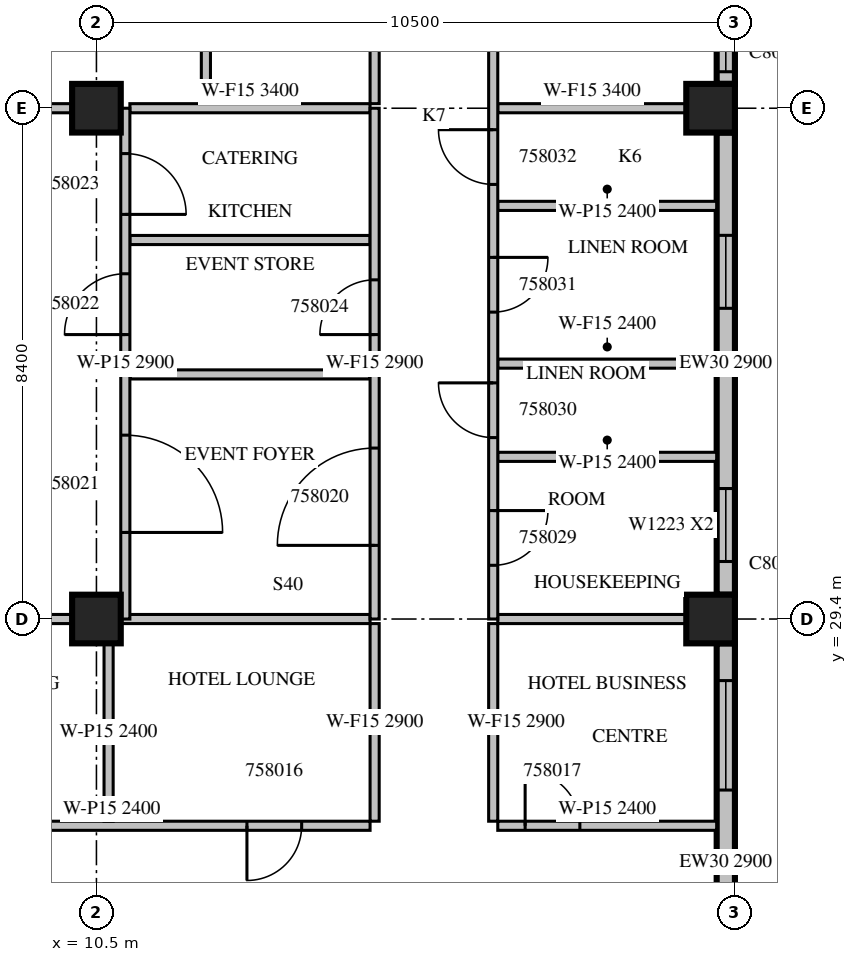
"""IFC4 building model, lengths in metres.
Left out: names, types, materials, properties, quantities, classifications, styles, units other than length and angle.
Written with IfcOpenShell. Run it as: python <this file> out.ifc"""

import sys

from ifc_helpers import new_model, si_unit, direction, frame, frame_2d, origin, origin_2d, place, context, subcontext, project, spatial, rectangle, extrude, source, transform, mapped, element, fill, save


model = new_model("IFC4")
c1 = context("Model", 3, precision=1e-05, world=origin(), true_north=direction((0.0, 1.0)))
c2 = subcontext(c1, "Body", "Model", "MODEL_VIEW")
j1 = project(units=[si_unit("LENGTHUNIT", "METRE"), si_unit("PLANEANGLEUNIT", "RADIAN")], contexts=[c1])
p1 = place(None, origin())
s1 = spatial("IfcSite", under=j1, at=p1, CompositionType="ELEMENT")
p2 = place(p1, origin())
s2 = spatial("IfcBuilding", under=s1, at=p2, CompositionType="ELEMENT")
p3 = place(p2, frame((0.0, 0.0, 253.8)))
s3 = spatial("IfcBuildingStorey", under=s2, at=p3, CompositionType="ELEMENT", Elevation=253.8)
m1 = source(origin(), c2, "Body", "SweptSolid", [
    extrude(rectangle(XDim=0.8, YDim=0.8, at=origin_2d()), origin(), (0.0, 0.0, 1.0), 3.8),
])
for number, where, z_axis, x_axis in (
    (1, (10.5, 29.4, 0.0), (0.0, 0.0, 1.0), (1.0, 0.0, 0.0)),
    (2, (20.6, 29.4, 0.0), (0.0, 0.0, 1.0), (1.0, 0.0, 0.0)),
    (3, (10.5, 37.8, 0.0), (0.0, 0.0, 1.0), (1.0, 0.0, 0.0)),
    (4, (20.6, 37.8, 0.0), (0.0, 0.0, 1.0), (1.0, 0.0, 0.0)),
):
    element("IfcColumn", number, at=place(p3, frame(where, z_axis=z_axis, x_axis=x_axis)), inside=s3, PredefinedType="COLUMN", context=c2, shape_type="MappedRepresentation", body=[
        mapped(m1, transform((0.0, 0.0, 0.0), scale=1.0)),
    ])
m2 = source(origin(), c2, "Body", "SweptSolid", [
    extrude(rectangle(XDim=7.2, YDim=0.3, at=frame_2d((3.6, 0.0))), origin(), (0.0, 0.0, 1.0), 2.9),
])
p4 = place(p3, frame((20.85, 21.8, 0.0), z_axis=(0.0, 0.0, 1.0), x_axis=(0.0, 1.0, 0.0)))
e5 = element("IfcWall", 5, at=p4, inside=s3, PredefinedType="STANDARD", context=c2, shape_type="MappedRepresentation", body=[
    mapped(m2, transform((0.0, 0.0, 0.0), scale=1.0)),
])
m3 = source(origin(), c2, "Body", "SweptSolid", [
    extrude(rectangle(XDim=1.8, YDim=2.3, at=frame_2d((0.9, 1.15))), frame((0.0, 0.16, 0.0), z_axis=(0.0, -1.0, 0.0), x_axis=(1.0, 0.0, 0.0)), (0.0, 0.0, 1.0), 0.32),
])
p5 = place(p4, frame((0.4, 0.0, 0.6)))
e6 = element("IfcOpeningElement", 6, at=p5, cuts=e5, PredefinedType="OPENING", context=c2, shape_type="MappedRepresentation", body=[
    mapped(m3, transform((0.0, 0.0, 0.0), scale=1.0)),
])
p6 = place(p4, frame((4.787, 0.0, 0.6)))
e7 = element("IfcOpeningElement", 7, at=p6, cuts=e5, PredefinedType="OPENING", context=c2, shape_type="MappedRepresentation", body=[
    mapped(m3, transform((0.0, 0.0, 0.0), scale=1.0)),
])
m4 = source(origin(), c2, "Body", "SweptSolid", [
    extrude(rectangle(XDim=7.6, YDim=0.3, at=frame_2d((3.8, 0.0))), origin(), (0.0, 0.0, 1.0), 2.9),
])
p7 = place(p3, frame((20.85, 29.8, 0.0), z_axis=(0.0, 0.0, 1.0), x_axis=(0.0, 1.0, 0.0)))
e8 = element("IfcWall", 8, at=p7, inside=s3, PredefinedType="STANDARD", context=c2, shape_type="MappedRepresentation", body=[
    mapped(m4, transform((0.0, 0.0, 0.0), scale=1.0)),
])
m5 = source(origin(), c2, "Body", "SweptSolid", [
    extrude(rectangle(XDim=1.2, YDim=2.3, at=frame_2d((0.6, 1.15))), frame((0.0, 0.16, 0.0), z_axis=(0.0, -1.0, 0.0), x_axis=(1.0, 0.0, 0.0)), (0.0, 0.0, 1.0), 0.32),
])
p8 = place(p7, frame((0.546, 0.0, 0.6)))
e9 = element("IfcOpeningElement", 9, at=p8, cuts=e8, PredefinedType="OPENING", context=c2, shape_type="MappedRepresentation", body=[
    mapped(m5, transform((0.0, 0.0, 0.0), scale=1.0)),
])
p9 = place(p7, frame((4.71, 0.0, 0.6)))
e10 = element("IfcOpeningElement", 10, at=p9, cuts=e8, PredefinedType="OPENING", context=c2, shape_type="MappedRepresentation", body=[
    mapped(m5, transform((0.0, 0.0, 0.0), scale=1.0)),
])
m6 = source(origin(), c2, "Body", "SweptSolid", [
    extrude(rectangle(XDim=3.8, YDim=0.3, at=frame_2d((1.9, 0.0))), origin(), (0.0, 0.0, 1.0), 3.4),
])
p10 = place(p3, frame((20.85, 38.2, 0.0), z_axis=(0.0, 0.0, 1.0), x_axis=(0.0, 1.0, 0.0)))
e11 = element("IfcWall", 11, at=p10, inside=s3, PredefinedType="STANDARD", context=c2, shape_type="MappedRepresentation", body=[
    mapped(m6, transform((0.0, 0.0, 0.0), scale=1.0)),
])
m7 = source(origin(), c2, "Body", "SweptSolid", [
    extrude(rectangle(XDim=3.0, YDim=2.3, at=frame_2d((1.5, 1.15))), frame((0.0, 0.16, 0.0), z_axis=(0.0, -1.0, 0.0), x_axis=(1.0, 0.0, 0.0)), (0.0, 0.0, 1.0), 0.32),
])
p11 = place(p10, frame((0.2, 0.0, 0.6)))
e12 = element("IfcOpeningElement", 12, at=p11, cuts=e11, PredefinedType="OPENING", context=c2, shape_type="MappedRepresentation", body=[
    mapped(m7, transform((0.0, 0.0, 0.0), scale=1.0)),
])
m8 = source(origin(), c2, "Body", "SweptSolid", [
    extrude(rectangle(XDim=8.495, YDim=0.15, at=frame_2d((4.247, 0.0))), origin(), (0.0, 0.0, 1.0), 2.4),
])
p12 = place(p3, frame((6.505, 26.0, 0.0), z_axis=(0.0, 0.0, 1.0), x_axis=(1.0, 0.0, 0.0)))
e13 = element("IfcWall", 13, at=p12, inside=s3, PredefinedType="PARTITIONING", context=c2, shape_type="MappedRepresentation", body=[
    mapped(m8, transform((0.0, 0.0, 0.0), scale=1.0)),
])
m9 = source(origin(), c2, "Body", "SweptSolid", [
    extrude(rectangle(XDim=0.9, YDim=2.1, at=frame_2d((0.45, 1.05))), frame((0.0, 0.085, 0.0), z_axis=(0.0, -1.0, 0.0), x_axis=(1.0, 0.0, 0.0)), (0.0, 0.0, 1.0), 0.17),
])
p13 = place(p12, frame((1.395, 0.0, 0.0)))
e14 = element("IfcOpeningElement", 14, at=p13, cuts=e13, PredefinedType="OPENING", context=c2, shape_type="MappedRepresentation", body=[
    mapped(m9, transform((0.0, 0.0, 0.0), scale=1.0)),
])
p14 = place(p12, frame((6.47, 0.0, 0.0)))
e15 = element("IfcOpeningElement", 15, at=p14, cuts=e13, PredefinedType="OPENING", context=c2, shape_type="MappedRepresentation", body=[
    mapped(m9, transform((0.0, 0.0, 0.0), scale=1.0)),
])
m10 = source(origin(), c2, "Body", "SweptSolid", [
    extrude(rectangle(XDim=3.6, YDim=0.15, at=frame_2d((1.8, 0.0))), origin(), (0.0, 0.0, 1.0), 2.4),
])
p15 = place(p3, frame((17.1, 26.0, 0.0), z_axis=(0.0, 0.0, 1.0), x_axis=(1.0, 0.0, 0.0)))
e16 = element("IfcWall", 16, at=p15, inside=s3, PredefinedType="PARTITIONING", context=c2, shape_type="MappedRepresentation", body=[
    mapped(m10, transform((0.0, 0.0, 0.0), scale=1.0)),
])
p16 = place(p15, frame((0.45, 0.0, 0.0)))
e17 = element("IfcOpeningElement", 17, at=p16, cuts=e16, PredefinedType="OPENING", context=c2, shape_type="MappedRepresentation", body=[
    mapped(m9, transform((0.0, 0.0, 0.0), scale=1.0)),
])
p17 = place(p3, frame((10.7, 26.075, 0.0), z_axis=(0.0, 0.0, 1.0), x_axis=(0.0, 1.0, 0.0)))
e18 = element("IfcWall", 18, at=p17, inside=s3, PredefinedType="PARTITIONING", context=c2, shape_type="SweptSolid", body=[
    extrude(rectangle(XDim=2.926, YDim=0.15, at=frame_2d((1.463, 0.0))), origin(), (0.0, 0.0, 1.0), 2.4),
])
p18 = place(p3, frame((15.075, 26.075, 0.0), z_axis=(0.0, 0.0, 1.0), x_axis=(0.0, 1.0, 0.0)))
e19 = element("IfcWall", 19, at=p18, inside=s3, PredefinedType="PARTITIONING", context=c2, shape_type="SweptSolid", body=[
    extrude(rectangle(XDim=3.25, YDim=0.15, at=frame_2d((1.625, 0.0))), origin(), (0.0, 0.0, 1.0), 2.9),
])
m11 = source(origin(), c2, "Body", "SweptSolid", [
    extrude(rectangle(XDim=3.25, YDim=0.15, at=frame_2d((1.625, 0.0))), origin(), (0.0, 0.0, 1.0), 2.9),
])
p19 = place(p3, frame((17.025, 29.325, 0.0), z_axis=(0.0, 0.0, 1.0), x_axis=(0.0, -1.0, 0.0)))
e20 = element("IfcWall", 20, at=p19, inside=s3, PredefinedType="PARTITIONING", context=c2, shape_type="MappedRepresentation", body=[
    mapped(m11, transform((0.0, 0.0, 0.0), scale=1.0)),
])
m12 = source(origin(), c2, "Body", "SweptSolid", [
    extrude(rectangle(XDim=3.596, YDim=0.15, at=frame_2d((1.798, 0.0))), origin(), (0.0, 0.0, 1.0), 3.4),
])
p20 = place(p3, frame((10.101, 29.4, 0.0), z_axis=(0.0, 0.0, 1.0), x_axis=(-1.0, 0.0, 0.0)))
e21 = element("IfcWall", 21, at=p20, inside=s3, PredefinedType="PARTITIONING", context=c2, shape_type="MappedRepresentation", body=[
    mapped(m12, transform((0.0, 0.0, 0.0), scale=1.0)),
])
m13 = source(origin(), c2, "Body", "SweptSolid", [
    extrude(rectangle(XDim=4.101, YDim=0.15, at=frame_2d((2.05, 0.0))), origin(), (0.0, 0.0, 1.0), 3.4),
])
p21 = place(p3, frame((15.0, 29.4, 0.0), z_axis=(0.0, 0.0, 1.0), x_axis=(-1.0, 0.0, 0.0)))
e22 = element("IfcWall", 22, at=p21, inside=s3, PredefinedType="PARTITIONING", context=c2, shape_type="MappedRepresentation", body=[
    mapped(m13, transform((0.0, 0.0, 0.0), scale=1.0)),
])
m14 = source(origin(), c2, "Body", "SweptSolid", [
    extrude(rectangle(XDim=3.101, YDim=0.15, at=frame_2d((1.55, 0.0))), origin(), (0.0, 0.0, 1.0), 3.4),
])
p22 = place(p3, frame((20.201, 29.4, 0.0), z_axis=(0.0, 0.0, 1.0), x_axis=(-1.0, 0.0, 0.0)))
e23 = element("IfcWall", 23, at=p22, inside=s3, PredefinedType="PARTITIONING", context=c2, shape_type="MappedRepresentation", body=[
    mapped(m14, transform((0.0, 0.0, 0.0), scale=1.0)),
])
m15 = source(origin(), c2, "Body", "SweptSolid", [
    extrude(rectangle(XDim=6.45, YDim=0.15, at=frame_2d((3.225, 0.0))), origin(), (0.0, 0.0, 1.0), 3.4),
])
p23 = place(p3, frame((12.3, 44.325, 0.0), z_axis=(0.0, 0.0, 1.0), x_axis=(0.0, -1.0, 0.0)))
e24 = element("IfcWall", 24, at=p23, inside=s3, PredefinedType="PARTITIONING", context=c2, shape_type="MappedRepresentation", body=[
    mapped(m15, transform((0.0, 0.0, 0.0), scale=1.0)),
])
p24 = place(p3, frame((15.075, 37.875, 0.0), z_axis=(0.0, 0.0, 1.0), x_axis=(0.0, 1.0, 0.0)))
e25 = element("IfcWall", 25, at=p24, inside=s3, PredefinedType="PARTITIONING", context=c2, shape_type="MappedRepresentation", body=[
    mapped(m15, transform((0.0, 0.0, 0.0), scale=1.0)),
])
p25 = place(p24, frame((2.737, 0.0, 0.0)))
e26 = element("IfcOpeningElement", 26, at=p25, cuts=e25, PredefinedType="OPENING", context=c2, shape_type="MappedRepresentation", body=[
    mapped(m9, transform((0.0, 0.0, 0.0), scale=1.0)),
])
m16 = source(origin(), c2, "Body", "SweptSolid", [
    extrude(rectangle(XDim=3.95, YDim=0.15, at=frame_2d((1.975, 0.0))), origin(), (0.0, 0.0, 1.0), 3.4),
])
for number, where, z_axis, x_axis in (
    (27, (15.0, 33.422, 0.0), (0.0, 0.0, 1.0), (-1.0, 0.0, 0.0)),
    (28, (15.0, 35.633, 0.0), (0.0, 0.0, 1.0), (-1.0, 0.0, 0.0)),
):
    element("IfcWall", number, at=place(p3, frame(where, z_axis=z_axis, x_axis=x_axis)), inside=s3, PredefinedType="PARTITIONING", context=c2, shape_type="MappedRepresentation", body=[
        mapped(m16, transform((0.0, 0.0, 0.0), scale=1.0)),
    ])
p26 = place(p3, frame((10.101, 37.8, 0.0), z_axis=(0.0, 0.0, 1.0), x_axis=(-1.0, 0.0, 0.0)))
e29 = element("IfcWall", 29, at=p26, inside=s3, PredefinedType="PARTITIONING", context=c2, shape_type="MappedRepresentation", body=[
    mapped(m12, transform((0.0, 0.0, 0.0), scale=1.0)),
])
p27 = place(p3, frame((15.0, 37.8, 0.0), z_axis=(0.0, 0.0, 1.0), x_axis=(-1.0, 0.0, 0.0)))
e30 = element("IfcWall", 30, at=p27, inside=s3, PredefinedType="PARTITIONING", context=c2, shape_type="MappedRepresentation", body=[
    mapped(m16, transform((0.0, 0.0, 0.0), scale=1.0)),
])
m17 = source(origin(), c2, "Body", "SweptSolid", [
    extrude(rectangle(XDim=8.4, YDim=0.15, at=frame_2d((4.2, 0.0))), origin(), (0.0, 0.0, 1.0), 2.9),
])
p28 = place(p3, frame((10.975, 29.4, 0.0), z_axis=(0.0, 0.0, 1.0), x_axis=(0.0, 1.0, 0.0)))
e31 = element("IfcWall", 31, at=p28, inside=s3, PredefinedType="PARTITIONING", context=c2, shape_type="MappedRepresentation", body=[
    mapped(m17, transform((0.0, 0.0, 0.0), scale=1.0)),
])
m18 = source(origin(), c2, "Body", "SweptSolid", [
    extrude(rectangle(XDim=1.6, YDim=2.1, at=frame_2d((0.8, 1.05))), frame((0.0, 0.085, 0.0), z_axis=(0.0, -1.0, 0.0), x_axis=(1.0, 0.0, 0.0)), (0.0, 0.0, 1.0), 0.17),
])
p29 = place(p28, frame((1.424, 0.0, 0.0)))
e32 = element("IfcOpeningElement", 32, at=p29, cuts=e31, PredefinedType="OPENING", context=c2, shape_type="MappedRepresentation", body=[
    mapped(m18, transform((0.0, 0.0, 0.0), scale=1.0)),
])
m19 = source(origin(), c2, "Body", "SweptSolid", [
    extrude(rectangle(XDim=1.0, YDim=2.1, at=frame_2d((0.5, 1.05))), frame((0.0, 0.085, 0.0), z_axis=(0.0, -1.0, 0.0), x_axis=(1.0, 0.0, 0.0)), (0.0, 0.0, 1.0), 0.17),
])
p30 = place(p28, frame((4.678, 0.0, 0.0)))
e33 = element("IfcOpeningElement", 33, at=p30, cuts=e31, PredefinedType="OPENING", context=c2, shape_type="MappedRepresentation", body=[
    mapped(m19, transform((0.0, 0.0, 0.0), scale=1.0)),
])
p31 = place(p28, frame((6.654, 0.0, 0.0)))
e34 = element("IfcOpeningElement", 34, at=p31, cuts=e31, PredefinedType="OPENING", context=c2, shape_type="MappedRepresentation", body=[
    mapped(m19, transform((0.0, 0.0, 0.0), scale=1.0)),
])
for number, where, z_axis, x_axis in (
    (35, (17.1, 32.067, 0.0), (0.0, 0.0, 1.0), (1.0, 0.0, 0.0)),
    (36, (17.1, 36.194, 0.0), (0.0, 0.0, 1.0), (1.0, 0.0, 0.0)),
    (37, (20.7, 33.6, 0.0), (0.0, 0.0, 1.0), (-1.0, 0.0, 0.0)),
):
    element("IfcWall", number, at=place(p3, frame(where, z_axis=z_axis, x_axis=x_axis)), inside=s3, PredefinedType="PARTITIONING", context=c2, shape_type="MappedRepresentation", body=[
        mapped(m10, transform((0.0, 0.0, 0.0), scale=1.0)),
    ])
p32 = place(p3, frame((20.201, 37.8, 0.0), z_axis=(0.0, 0.0, 1.0), x_axis=(-1.0, 0.0, 0.0)))
e38 = element("IfcWall", 38, at=p32, inside=s3, PredefinedType="PARTITIONING", context=c2, shape_type="MappedRepresentation", body=[
    mapped(m14, transform((0.0, 0.0, 0.0), scale=1.0)),
])
p33 = place(p3, frame((15.075, 29.4, 0.0), z_axis=(0.0, 0.0, 1.0), x_axis=(0.0, 1.0, 0.0)))
e39 = element("IfcWall", 39, at=p33, inside=s3, PredefinedType="PARTITIONING", context=c2, shape_type="MappedRepresentation", body=[
    mapped(m17, transform((0.0, 0.0, 0.0), scale=1.0)),
])
p34 = place(p33, frame((1.211, 0.0, 0.0)))
e40 = element("IfcOpeningElement", 40, at=p34, cuts=e39, PredefinedType="OPENING", context=c2, shape_type="MappedRepresentation", body=[
    mapped(m18, transform((0.0, 0.0, 0.0), scale=1.0)),
])
p35 = place(p33, frame((4.678, 0.0, 0.0)))
e41 = element("IfcOpeningElement", 41, at=p35, cuts=e39, PredefinedType="OPENING", context=c2, shape_type="MappedRepresentation", body=[
    mapped(m9, transform((0.0, 0.0, 0.0), scale=1.0)),
])
m20 = source(origin(), c2, "Body", "SweptSolid", [
    extrude(rectangle(XDim=19.86, YDim=0.15, at=frame_2d((9.93, 0.0))), origin(), (0.0, 0.0, 1.0), 2.9),
])
p36 = place(p3, frame((17.025, 49.26, 0.0), z_axis=(0.0, 0.0, 1.0), x_axis=(0.0, -1.0, 0.0)))
e42 = element("IfcWall", 42, at=p36, inside=s3, PredefinedType="PARTITIONING", context=c2, shape_type="MappedRepresentation", body=[
    mapped(m20, transform((0.0, 0.0, 0.0), scale=1.0)),
])
p37 = place(p36, frame((18.076, 0.0, 0.0)))
e43 = element("IfcOpeningElement", 43, at=p37, cuts=e42, PredefinedType="OPENING", context=c2, shape_type="MappedRepresentation", body=[
    mapped(m9, transform((0.0, 0.0, 0.0), scale=1.0)),
])
p38 = place(p36, frame((15.976, 0.0, 0.0)))
e44 = element("IfcOpeningElement", 44, at=p38, cuts=e42, PredefinedType="OPENING", context=c2, shape_type="MappedRepresentation", body=[
    mapped(m9, transform((0.0, 0.0, 0.0), scale=1.0)),
])
p39 = place(p36, frame((13.913, 0.0, 0.0)))
e45 = element("IfcOpeningElement", 45, at=p39, cuts=e42, PredefinedType="OPENING", context=c2, shape_type="MappedRepresentation", body=[
    mapped(m9, transform((0.0, 0.0, 0.0), scale=1.0)),
])
p40 = place(p36, frame((11.813, 0.0, 0.0)))
e46 = element("IfcOpeningElement", 46, at=p40, cuts=e42, PredefinedType="OPENING", context=c2, shape_type="MappedRepresentation", body=[
    mapped(m9, transform((0.0, 0.0, 0.0), scale=1.0)),
])
p41 = place(p36, frame((6.63, 0.0, 0.0)))
e47 = element("IfcOpeningElement", 47, at=p41, cuts=e42, PredefinedType="OPENING", context=c2, shape_type="MappedRepresentation", body=[
    mapped(m19, transform((0.0, 0.0, 0.0), scale=1.0)),
])
m21 = source(origin(), c2, "Body", "SweptSolid", [
    extrude(rectangle(XDim=1.8, YDim=2.3, at=frame_2d((0.9, 1.15))), frame((0.0, 0.03, 0.0), z_axis=(0.0, -1.0, 0.0), x_axis=(1.0, 0.0, 0.0)), (0.0, 0.0, 1.0), 0.06),
])
p42 = place(p6, origin())
e48 = element("IfcWindow", 48, at=p42, inside=s3, PartitioningType="SINGLE_PANEL", PredefinedType="WINDOW", context=c2, shape_type="MappedRepresentation", body=[
    mapped(m21, transform((0.0, 0.0, 0.0), scale=1.0)),
])
fill(e7, e48)
m22 = source(origin(), c2, "Body", "SweptSolid", [
    extrude(rectangle(XDim=1.2, YDim=2.3, at=frame_2d((0.6, 1.15))), frame((0.0, 0.03, 0.0), z_axis=(0.0, -1.0, 0.0), x_axis=(1.0, 0.0, 0.0)), (0.0, 0.0, 1.0), 0.06),
])
p43 = place(p8, origin())
e49 = element("IfcWindow", 49, at=p43, inside=s3, PartitioningType="SINGLE_PANEL", PredefinedType="WINDOW", context=c2, shape_type="MappedRepresentation", body=[
    mapped(m22, transform((0.0, 0.0, 0.0), scale=1.0)),
])
fill(e9, e49)
p44 = place(p9, origin())
e50 = element("IfcWindow", 50, at=p44, inside=s3, PartitioningType="SINGLE_PANEL", PredefinedType="WINDOW", context=c2, shape_type="MappedRepresentation", body=[
    mapped(m22, transform((0.0, 0.0, 0.0), scale=1.0)),
])
fill(e10, e50)
m23 = source(origin(), c2, "Body", "SweptSolid", [
    extrude(rectangle(XDim=3.0, YDim=2.3, at=frame_2d((1.5, 1.15))), frame((0.0, 0.03, 0.0), z_axis=(0.0, -1.0, 0.0), x_axis=(1.0, 0.0, 0.0)), (0.0, 0.0, 1.0), 0.06),
])
p45 = place(p11, origin())
e51 = element("IfcWindow", 51, at=p45, inside=s3, PartitioningType="SINGLE_PANEL", PredefinedType="WINDOW", context=c2, shape_type="MappedRepresentation", body=[
    mapped(m23, transform((0.0, 0.0, 0.0), scale=1.0)),
])
fill(e12, e51)
m24 = source(origin(), c2, "Body", "SweptSolid", [
    extrude(rectangle(XDim=0.9, YDim=2.1, at=frame_2d((0.45, 1.05))), frame((0.0, 0.025, 0.0), z_axis=(0.0, -1.0, 0.0), x_axis=(1.0, 0.0, 0.0)), (0.0, 0.0, 1.0), 0.05),
])
p46 = place(p14, origin())
e52 = element("IfcDoor", 52, at=p46, inside=s3, OperationType="SINGLE_SWING_RIGHT", PredefinedType="DOOR", context=c2, shape_type="MappedRepresentation", body=[
    mapped(m24, transform((0.0, 0.0, 0.0), scale=1.0)),
])
fill(e15, e52)
p47 = place(p16, origin())
e53 = element("IfcDoor", 53, at=p47, inside=s3, OperationType="SINGLE_SWING_LEFT", PredefinedType="DOOR", context=c2, shape_type="MappedRepresentation", body=[
    mapped(m24, transform((0.0, 0.0, 0.0), scale=1.0)),
])
fill(e17, e53)
m25 = source(origin(), c2, "Body", "SweptSolid", [
    extrude(rectangle(XDim=1.6, YDim=2.1, at=frame_2d((0.8, 1.05))), frame((0.0, 0.025, 0.0), z_axis=(0.0, -1.0, 0.0), x_axis=(1.0, 0.0, 0.0)), (0.0, 0.0, 1.0), 0.05),
])
p48 = place(p34, origin())
e54 = element("IfcDoor", 54, at=p48, inside=s3, OperationType="SINGLE_SWING_LEFT", PredefinedType="DOOR", context=c2, shape_type="MappedRepresentation", body=[
    mapped(m25, transform((0.0, 0.0, 0.0), scale=1.0)),
])
fill(e40, e54)
p49 = place(p29, origin())
e55 = element("IfcDoor", 55, at=p49, inside=s3, OperationType="SINGLE_SWING_RIGHT", PredefinedType="DOOR", context=c2, shape_type="MappedRepresentation", body=[
    mapped(m25, transform((0.0, 0.0, 0.0), scale=1.0)),
])
fill(e32, e55)
m26 = source(origin(), c2, "Body", "SweptSolid", [
    extrude(rectangle(XDim=1.0, YDim=2.1, at=frame_2d((0.5, 1.05))), frame((0.0, 0.025, 0.0), z_axis=(0.0, -1.0, 0.0), x_axis=(1.0, 0.0, 0.0)), (0.0, 0.0, 1.0), 0.05),
])
p50 = place(p30, origin())
e56 = element("IfcDoor", 56, at=p50, inside=s3, OperationType="SINGLE_SWING_LEFT", PredefinedType="DOOR", context=c2, shape_type="MappedRepresentation", body=[
    mapped(m26, transform((0.0, 0.0, 0.0), scale=1.0)),
])
fill(e33, e56)
p51 = place(p31, origin())
e57 = element("IfcDoor", 57, at=p51, inside=s3, OperationType="SINGLE_SWING_RIGHT", PredefinedType="DOOR", context=c2, shape_type="MappedRepresentation", body=[
    mapped(m26, transform((0.0, 0.0, 0.0), scale=1.0)),
])
fill(e34, e57)
p52 = place(p35, origin())
e58 = element("IfcDoor", 58, at=p52, inside=s3, OperationType="SINGLE_SWING_LEFT", PredefinedType="DOOR", context=c2, shape_type="MappedRepresentation", body=[
    mapped(m24, transform((0.0, 0.0, 0.0), scale=1.0)),
])
fill(e41, e58)
p53 = place(p37, origin())
e59 = element("IfcDoor", 59, at=p53, inside=s3, OperationType="SINGLE_SWING_LEFT", PredefinedType="DOOR", context=c2, shape_type="MappedRepresentation", body=[
    mapped(m24, transform((0.0, 0.0, 0.0), scale=1.0)),
])
fill(e43, e59)
p54 = place(p38, origin())
e60 = element("IfcDoor", 60, at=p54, inside=s3, OperationType="SINGLE_SWING_RIGHT", PredefinedType="DOOR", context=c2, shape_type="MappedRepresentation", body=[
    mapped(m24, transform((0.0, 0.0, 0.0), scale=1.0)),
])
fill(e44, e60)
p55 = place(p39, origin())
e61 = element("IfcDoor", 61, at=p55, inside=s3, OperationType="SINGLE_SWING_LEFT", PredefinedType="DOOR", context=c2, shape_type="MappedRepresentation", body=[
    mapped(m24, transform((0.0, 0.0, 0.0), scale=1.0)),
])
fill(e45, e61)
p56 = place(p40, origin())
e62 = element("IfcDoor", 62, at=p56, inside=s3, OperationType="SINGLE_SWING_RIGHT", PredefinedType="DOOR", context=c2, shape_type="MappedRepresentation", body=[
    mapped(m24, transform((0.0, 0.0, 0.0), scale=1.0)),
])
fill(e46, e62)
save(model, sys.argv[1])
